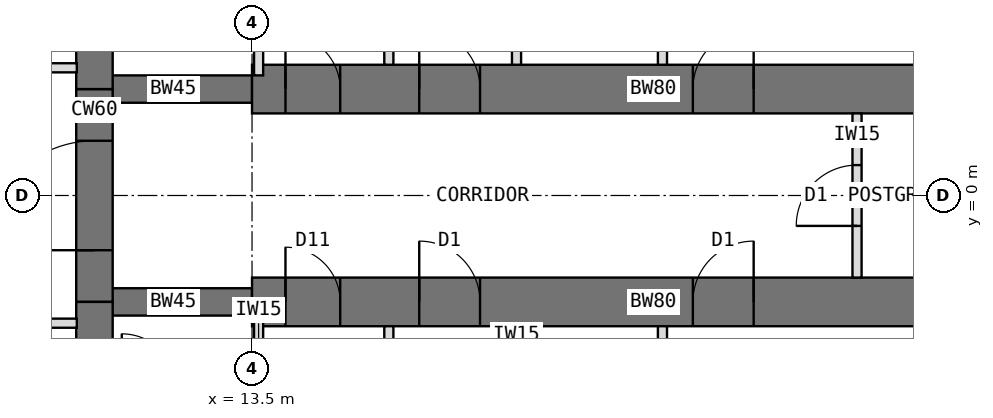
"""IFC4 building model, lengths in metres.
Left out: names, types, materials, properties, quantities, classifications, styles, units other than length and angle.
Written with IfcOpenShell. Run it as: python <this file> out.ifc"""

import sys

from ifc_helpers import new_model, si_unit, direction, frame, frame_2d, origin, place, context, subcontext, project, spatial, rectangle, extrude, element, fill, save


model = new_model("IFC4")
c1 = context("Model", 3, precision=1e-05, world=origin(), true_north=direction((0.0, 1.0)))
c2 = subcontext(c1, "Body", "Model", "MODEL_VIEW")
j1 = project(units=[si_unit("LENGTHUNIT", "METRE"), si_unit("PLANEANGLEUNIT", "RADIAN")], contexts=[c1])
p1 = place(None, origin())
s1 = spatial("IfcSite", under=j1, at=p1, CompositionType="ELEMENT")
p2 = place(p1, origin())
s2 = spatial("IfcBuilding", under=s1, at=p2, CompositionType="ELEMENT")
p3 = place(p2, frame((0.0, 0.0, 133.5)))
s3 = spatial("IfcBuildingStorey", under=s2, at=p3, CompositionType="ELEMENT", Elevation=133.5)
p4 = place(p3, frame((10.908, -6.298, 0.0), z_axis=(0.0, 0.0, 1.0), x_axis=(0.0, 1.0, 0.0)))
e1 = element("IfcWall", 1, at=p4, inside=s3, PredefinedType="SHEAR", context=c2, shape_type="SweptSolid", body=[
    extrude(rectangle(XDim=4.548, YDim=0.6, at=frame_2d((2.274, 0.0))), origin(), (0.0, 0.0, 1.0), 4.0),
])
p5 = place(p3, frame((10.908, -1.75, 0.0), z_axis=(0.0, 0.0, 1.0), x_axis=(0.0, 1.0, 0.0)))
e2 = element("IfcWall", 2, at=p5, inside=s3, PredefinedType="SHEAR", context=c2, shape_type="SweptSolid", body=[
    extrude(rectangle(XDim=3.5, YDim=0.6, at=frame_2d((1.75, 0.0))), origin(), (0.0, 0.0, 1.0), 4.0),
])
p6 = place(p5, frame((0.85, 0.0, 0.0)))
e3 = element("IfcOpeningElement", 3, at=p6, cuts=e2, PredefinedType="OPENING", context=c2, shape_type="SweptSolid", body=[
    extrude(rectangle(XDim=1.8, YDim=2.1, at=frame_2d((0.9, 1.05))), frame((0.0, 0.31, 0.0), z_axis=(0.0, -1.0, 0.0), x_axis=(1.0, 0.0, 0.0)), (0.0, 0.0, 1.0), 0.62),
])
p7 = place(p3, frame((10.908, 1.75, 0.0), z_axis=(0.0, 0.0, 1.0), x_axis=(0.0, 1.0, 0.0)))
e4 = element("IfcWall", 4, at=p7, inside=s3, PredefinedType="SHEAR", context=c2, shape_type="SweptSolid", body=[
    extrude(rectangle(XDim=4.548, YDim=0.6, at=frame_2d((2.274, 0.0))), origin(), (0.0, 0.0, 1.0), 4.0),
])
p8 = place(p3, frame((10.908, 1.75, 0.0), z_axis=(0.0, 0.0, 1.0), x_axis=(1.0, 0.0, 0.0)))
e5 = element("IfcWall", 5, at=p8, inside=s3, PredefinedType="SHEAR", context=c2, shape_type="SweptSolid", body=[
    extrude(rectangle(XDim=2.592, YDim=0.45, at=frame_2d((1.296, 0.0))), origin(), (0.0, 0.0, 1.0), 4.0),
])
p9 = place(p3, frame((13.5, 1.75, 0.0), z_axis=(0.0, 0.0, 1.0), x_axis=(1.0, 0.0, 0.0)))
e6 = element("IfcWall", 6, at=p9, inside=s3, PredefinedType="SHEAR", context=c2, shape_type="SweptSolid", body=[
    extrude(rectangle(XDim=13.2, YDim=0.8, at=frame_2d((6.6, 0.0))), origin(), (0.0, 0.0, 1.0), 4.0),
])
p10 = place(p9, frame((0.55, 0.0, 0.0)))
e7 = element("IfcOpeningElement", 7, at=p10, cuts=e6, PredefinedType="OPENING", context=c2, shape_type="SweptSolid", body=[
    extrude(rectangle(XDim=0.9, YDim=2.1, at=frame_2d((0.45, 1.05))), frame((0.0, 0.41, 0.0), z_axis=(0.0, -1.0, 0.0), x_axis=(1.0, 0.0, 0.0)), (0.0, 0.0, 1.0), 0.82),
])
p11 = place(p9, frame((2.75, 0.0, 0.0)))
e8 = element("IfcOpeningElement", 8, at=p11, cuts=e6, PredefinedType="OPENING", context=c2, shape_type="SweptSolid", body=[
    extrude(rectangle(XDim=1.0, YDim=2.1, at=frame_2d((0.5, 1.05))), frame((0.0, 0.41, 0.0), z_axis=(0.0, -1.0, 0.0), x_axis=(1.0, 0.0, 0.0)), (0.0, 0.0, 1.0), 0.82),
])
p12 = place(p9, frame((7.25, 0.0, 0.0)))
e9 = element("IfcOpeningElement", 9, at=p12, cuts=e6, PredefinedType="OPENING", context=c2, shape_type="SweptSolid", body=[
    extrude(rectangle(XDim=1.0, YDim=2.1, at=frame_2d((0.5, 1.05))), frame((0.0, 0.41, 0.0), z_axis=(0.0, -1.0, 0.0), x_axis=(1.0, 0.0, 0.0)), (0.0, 0.0, 1.0), 0.82),
])
p13 = place(p3, frame((10.908, -1.75, 0.0), z_axis=(0.0, 0.0, 1.0), x_axis=(1.0, 0.0, 0.0)))
e10 = element("IfcWall", 10, at=p13, inside=s3, PredefinedType="SHEAR", context=c2, shape_type="SweptSolid", body=[
    extrude(rectangle(XDim=2.592, YDim=0.45, at=frame_2d((1.296, 0.0))), origin(), (0.0, 0.0, 1.0), 4.0),
])
p14 = place(p3, frame((13.5, -1.75, 0.0), z_axis=(0.0, 0.0, 1.0), x_axis=(1.0, 0.0, 0.0)))
e11 = element("IfcWall", 11, at=p14, inside=s3, PredefinedType="SHEAR", context=c2, shape_type="SweptSolid", body=[
    extrude(rectangle(XDim=13.2, YDim=0.8, at=frame_2d((6.6, 0.0))), origin(), (0.0, 0.0, 1.0), 4.0),
])
p15 = place(p14, frame((0.55, 0.0, 0.0)))
e12 = element("IfcOpeningElement", 12, at=p15, cuts=e11, PredefinedType="OPENING", context=c2, shape_type="SweptSolid", body=[
    extrude(rectangle(XDim=0.9, YDim=2.1, at=frame_2d((0.45, 1.05))), frame((0.0, 0.41, 0.0), z_axis=(0.0, -1.0, 0.0), x_axis=(1.0, 0.0, 0.0)), (0.0, 0.0, 1.0), 0.82),
])
p16 = place(p14, frame((2.75, 0.0, 0.0)))
e13 = element("IfcOpeningElement", 13, at=p16, cuts=e11, PredefinedType="OPENING", context=c2, shape_type="SweptSolid", body=[
    extrude(rectangle(XDim=1.0, YDim=2.1, at=frame_2d((0.5, 1.05))), frame((0.0, 0.41, 0.0), z_axis=(0.0, -1.0, 0.0), x_axis=(1.0, 0.0, 0.0)), (0.0, 0.0, 1.0), 0.82),
])
p17 = place(p14, frame((7.25, 0.0, 0.0)))
e14 = element("IfcOpeningElement", 14, at=p17, cuts=e11, PredefinedType="OPENING", context=c2, shape_type="SweptSolid", body=[
    extrude(rectangle(XDim=1.0, YDim=2.1, at=frame_2d((0.5, 1.05))), frame((0.0, 0.41, 0.0), z_axis=(0.0, -1.0, 0.0), x_axis=(1.0, 0.0, 0.0)), (0.0, 0.0, 1.0), 0.82),
])
for number, where, z_axis, x_axis in (
    (15, (15.75, 2.15, 0.0), (0.0, 0.0, 1.0), (0.0, 1.0, 0.0)),
    (16, (20.25, 2.15, 0.0), (0.0, 0.0, 1.0), (0.0, 1.0, 0.0)),
):
    element("IfcWall", number, at=place(p3, frame(where, z_axis=z_axis, x_axis=x_axis)), inside=s3, PredefinedType="PARTITIONING", context=c2, shape_type="SweptSolid", body=[
        extrude(rectangle(XDim=4.6, YDim=0.15, at=frame_2d((2.3, 0.0))), origin(), (0.0, 0.0, 1.0), 3.8),
    ])
p18 = place(p3, frame((17.85, 2.15, 0.0), z_axis=(0.0, 0.0, 1.0), x_axis=(0.0, 1.0, 0.0)))
e17 = element("IfcWall", 17, at=p18, inside=s3, PredefinedType="PARTITIONING", context=c2, shape_type="SweptSolid", body=[
    extrude(rectangle(XDim=3.4, YDim=0.15, at=frame_2d((1.7, 0.0))), origin(), (0.0, 0.0, 1.0), 3.8),
])
p19 = place(p18, frame((1.2, 0.0, 0.0)))
e18 = element("IfcOpeningElement", 18, at=p19, cuts=e17, PredefinedType="OPENING", context=c2, shape_type="SweptSolid", body=[
    extrude(rectangle(XDim=1.0, YDim=2.1, at=frame_2d((0.5, 1.05))), frame((0.0, 0.085, 0.0), z_axis=(0.0, -1.0, 0.0), x_axis=(1.0, 0.0, 0.0)), (0.0, 0.0, 1.0), 0.17),
])
p20 = place(p3, frame((13.608, 1.975, 0.0), z_axis=(0.0, 0.0, 1.0), x_axis=(0.0, 1.0, 0.0)))
e19 = element("IfcWall", 19, at=p20, inside=s3, PredefinedType="PARTITIONING", context=c2, shape_type="SweptSolid", body=[
    extrude(rectangle(XDim=3.2, YDim=0.15, at=frame_2d((1.6, 0.0))), origin(), (0.0, 0.0, 1.0), 3.8),
])
for number, where, z_axis, x_axis in (
    (20, (15.75, -2.15, 0.0), (0.0, 0.0, 1.0), (0.0, -1.0, 0.0)),
    (21, (20.25, -2.15, 0.0), (0.0, 0.0, 1.0), (0.0, -1.0, 0.0)),
):
    element("IfcWall", number, at=place(p3, frame(where, z_axis=z_axis, x_axis=x_axis)), inside=s3, PredefinedType="PARTITIONING", context=c2, shape_type="SweptSolid", body=[
        extrude(rectangle(XDim=4.6, YDim=0.15, at=frame_2d((2.3, 0.0))), origin(), (0.0, 0.0, 1.0), 3.8),
    ])
p21 = place(p3, frame((17.85, -2.15, 0.0), z_axis=(0.0, 0.0, 1.0), x_axis=(0.0, -1.0, 0.0)))
e22 = element("IfcWall", 22, at=p21, inside=s3, PredefinedType="PARTITIONING", context=c2, shape_type="SweptSolid", body=[
    extrude(rectangle(XDim=3.4, YDim=0.15, at=frame_2d((1.7, 0.0))), origin(), (0.0, 0.0, 1.0), 3.8),
])
p22 = place(p21, frame((1.2, 0.0, 0.0)))
e23 = element("IfcOpeningElement", 23, at=p22, cuts=e22, PredefinedType="OPENING", context=c2, shape_type="SweptSolid", body=[
    extrude(rectangle(XDim=1.0, YDim=2.1, at=frame_2d((0.5, 1.05))), frame((0.0, 0.085, 0.0), z_axis=(0.0, -1.0, 0.0), x_axis=(1.0, 0.0, 0.0)), (0.0, 0.0, 1.0), 0.17),
])
p23 = place(p3, frame((13.608, -1.975, 0.0), z_axis=(0.0, 0.0, 1.0), x_axis=(0.0, -1.0, 0.0)))
e24 = element("IfcWall", 24, at=p23, inside=s3, PredefinedType="PARTITIONING", context=c2, shape_type="SweptSolid", body=[
    extrude(rectangle(XDim=1.2, YDim=0.15, at=frame_2d((0.6, 0.0))), origin(), (0.0, 0.0, 1.0), 3.8),
])
p24 = place(p3, frame((6.143, 2.1, 0.0), z_axis=(0.0, 0.0, 1.0), x_axis=(1.0, 0.0, 0.0)))
e25 = element("IfcWall", 25, at=p24, inside=s3, PredefinedType="PARTITIONING", context=c2, shape_type="SweptSolid", body=[
    extrude(rectangle(XDim=4.476, YDim=0.15, at=frame_2d((2.238, 0.0))), origin(), (0.0, 0.0, 1.0), 3.8),
])
p25 = place(p24, frame((2.633, 0.0, 0.0)))
e26 = element("IfcOpeningElement", 26, at=p25, cuts=e25, PredefinedType="OPENING", context=c2, shape_type="SweptSolid", body=[
    extrude(rectangle(XDim=1.0, YDim=2.1, at=frame_2d((0.5, 1.05))), frame((0.0, 0.085, 0.0), z_axis=(0.0, -1.0, 0.0), x_axis=(1.0, 0.0, 0.0)), (0.0, 0.0, 1.0), 0.17),
])
p26 = place(p3, frame((10.618, -2.1, 0.0), z_axis=(0.0, 0.0, 1.0), x_axis=(-1.0, 0.0, 0.0)))
e27 = element("IfcWall", 27, at=p26, inside=s3, PredefinedType="PARTITIONING", context=c2, shape_type="SweptSolid", body=[
    extrude(rectangle(XDim=4.476, YDim=0.15, at=frame_2d((2.238, 0.0))), origin(), (0.0, 0.0, 1.0), 3.8),
])
p27 = place(p26, frame((0.843, 0.0, 0.0)))
e28 = element("IfcOpeningElement", 28, at=p27, cuts=e27, PredefinedType="OPENING", context=c2, shape_type="SweptSolid", body=[
    extrude(rectangle(XDim=1.0, YDim=2.1, at=frame_2d((0.5, 1.05))), frame((0.0, 0.085, 0.0), z_axis=(0.0, -1.0, 0.0), x_axis=(1.0, 0.0, 0.0)), (0.0, 0.0, 1.0), 0.17),
])
p28 = place(p3, frame((23.45, -1.35, 0.0), z_axis=(0.0, 0.0, 1.0), x_axis=(0.0, 1.0, 0.0)))
e29 = element("IfcWall", 29, at=p28, inside=s3, PredefinedType="PARTITIONING", context=c2, shape_type="SweptSolid", body=[
    extrude(rectangle(XDim=2.7, YDim=0.15, at=frame_2d((1.35, 0.0))), origin(), (0.0, 0.0, 1.0), 3.8),
])
p29 = place(p28, frame((0.85, 0.0, 0.0)))
e30 = element("IfcOpeningElement", 30, at=p29, cuts=e29, PredefinedType="OPENING", context=c2, shape_type="SweptSolid", body=[
    extrude(rectangle(XDim=1.0, YDim=2.1, at=frame_2d((0.5, 1.05))), frame((0.0, 0.085, 0.0), z_axis=(0.0, -1.0, 0.0), x_axis=(1.0, 0.0, 0.0)), (0.0, 0.0, 1.0), 0.17),
])
p30 = place(p6, origin())
e31 = element("IfcDoor", 31, at=p30, inside=s3, OperationType="DOUBLE_DOOR_DOUBLE_SWING", PredefinedType="DOOR", context=c2, shape_type="SweptSolid", body=[
    extrude(rectangle(XDim=1.72, YDim=2.06, at=frame_2d((0.9, 1.03))), frame((0.0, 0.025, 0.0), z_axis=(0.0, -1.0, 0.0), x_axis=(1.0, 0.0, 0.0)), (0.0, 0.0, 1.0), 0.05),
    extrude(rectangle(XDim=0.04, YDim=2.1, at=frame_2d((0.02, 1.05))), frame((0.0, 0.3, 0.0), z_axis=(0.0, -1.0, 0.0), x_axis=(1.0, 0.0, 0.0)), (0.0, 0.0, 1.0), 0.6),
    extrude(rectangle(XDim=0.04, YDim=2.1, at=frame_2d((1.78, 1.05))), frame((0.0, 0.3, 0.0), z_axis=(0.0, -1.0, 0.0), x_axis=(1.0, 0.0, 0.0)), (0.0, 0.0, 1.0), 0.6),
    extrude(rectangle(XDim=1.72, YDim=0.04, at=frame_2d((0.9, 2.08))), frame((0.0, 0.3, 0.0), z_axis=(0.0, -1.0, 0.0), x_axis=(1.0, 0.0, 0.0)), (0.0, 0.0, 1.0), 0.6),
])
fill(e3, e31)
p31 = place(p29, origin())
e32 = element("IfcDoor", 32, at=p31, inside=s3, OperationType="SINGLE_SWING_LEFT", PredefinedType="DOOR", context=c2, shape_type="SweptSolid", body=[
    extrude(rectangle(XDim=1.0, YDim=2.1, at=frame_2d((0.5, 1.05))), frame((0.0, 0.025, 0.0), z_axis=(0.0, -1.0, 0.0), x_axis=(1.0, 0.0, 0.0)), (0.0, 0.0, 1.0), 0.05),
])
fill(e30, e32)
p32 = place(p10, origin())
e33 = element("IfcDoor", 33, at=p32, inside=s3, OperationType="SINGLE_SWING_LEFT", PredefinedType="DOOR", context=c2, shape_type="SweptSolid", body=[
    extrude(rectangle(XDim=0.82, YDim=2.06, at=frame_2d((0.45, 1.03))), frame((0.0, 0.025, 0.0), z_axis=(0.0, -1.0, 0.0), x_axis=(1.0, 0.0, 0.0)), (0.0, 0.0, 1.0), 0.05),
    extrude(rectangle(XDim=0.04, YDim=2.1, at=frame_2d((0.02, 1.05))), frame((0.0, 0.4, 0.0), z_axis=(0.0, -1.0, 0.0), x_axis=(1.0, 0.0, 0.0)), (0.0, 0.0, 1.0), 0.8),
    extrude(rectangle(XDim=0.04, YDim=2.1, at=frame_2d((0.88, 1.05))), frame((0.0, 0.4, 0.0), z_axis=(0.0, -1.0, 0.0), x_axis=(1.0, 0.0, 0.0)), (0.0, 0.0, 1.0), 0.8),
    extrude(rectangle(XDim=0.82, YDim=0.04, at=frame_2d((0.45, 2.08))), frame((0.0, 0.4, 0.0), z_axis=(0.0, -1.0, 0.0), x_axis=(1.0, 0.0, 0.0)), (0.0, 0.0, 1.0), 0.8),
])
fill(e7, e33)
p33 = place(p11, origin())
e34 = element("IfcDoor", 34, at=p33, inside=s3, OperationType="SINGLE_SWING_LEFT", PredefinedType="DOOR", context=c2, shape_type="SweptSolid", body=[
    extrude(rectangle(XDim=0.92, YDim=2.06, at=frame_2d((0.5, 1.03))), frame((0.0, 0.025, 0.0), z_axis=(0.0, -1.0, 0.0), x_axis=(1.0, 0.0, 0.0)), (0.0, 0.0, 1.0), 0.05),
    extrude(rectangle(XDim=0.04, YDim=2.1, at=frame_2d((0.02, 1.05))), frame((0.0, 0.4, 0.0), z_axis=(0.0, -1.0, 0.0), x_axis=(1.0, 0.0, 0.0)), (0.0, 0.0, 1.0), 0.8),
    extrude(rectangle(XDim=0.04, YDim=2.1, at=frame_2d((0.98, 1.05))), frame((0.0, 0.4, 0.0), z_axis=(0.0, -1.0, 0.0), x_axis=(1.0, 0.0, 0.0)), (0.0, 0.0, 1.0), 0.8),
    extrude(rectangle(XDim=0.92, YDim=0.04, at=frame_2d((0.5, 2.08))), frame((0.0, 0.4, 0.0), z_axis=(0.0, -1.0, 0.0), x_axis=(1.0, 0.0, 0.0)), (0.0, 0.0, 1.0), 0.8),
])
fill(e8, e34)
p34 = place(p12, origin())
e35 = element("IfcDoor", 35, at=p34, inside=s3, OperationType="SINGLE_SWING_RIGHT", PredefinedType="DOOR", context=c2, shape_type="SweptSolid", body=[
    extrude(rectangle(XDim=0.92, YDim=2.06, at=frame_2d((0.5, 1.03))), frame((0.0, 0.025, 0.0), z_axis=(0.0, -1.0, 0.0), x_axis=(1.0, 0.0, 0.0)), (0.0, 0.0, 1.0), 0.05),
    extrude(rectangle(XDim=0.04, YDim=2.1, at=frame_2d((0.02, 1.05))), frame((0.0, 0.4, 0.0), z_axis=(0.0, -1.0, 0.0), x_axis=(1.0, 0.0, 0.0)), (0.0, 0.0, 1.0), 0.8),
    extrude(rectangle(XDim=0.04, YDim=2.1, at=frame_2d((0.98, 1.05))), frame((0.0, 0.4, 0.0), z_axis=(0.0, -1.0, 0.0), x_axis=(1.0, 0.0, 0.0)), (0.0, 0.0, 1.0), 0.8),
    extrude(rectangle(XDim=0.92, YDim=0.04, at=frame_2d((0.5, 2.08))), frame((0.0, 0.4, 0.0), z_axis=(0.0, -1.0, 0.0), x_axis=(1.0, 0.0, 0.0)), (0.0, 0.0, 1.0), 0.8),
])
fill(e9, e35)
p35 = place(p15, origin())
e36 = element("IfcDoor", 36, at=p35, inside=s3, OperationType="SINGLE_SWING_LEFT", PredefinedType="DOOR", context=c2, shape_type="SweptSolid", body=[
    extrude(rectangle(XDim=0.82, YDim=2.06, at=frame_2d((0.45, 1.03))), frame((0.0, 0.025, 0.0), z_axis=(0.0, -1.0, 0.0), x_axis=(1.0, 0.0, 0.0)), (0.0, 0.0, 1.0), 0.05),
    extrude(rectangle(XDim=0.04, YDim=2.1, at=frame_2d((0.02, 1.05))), frame((0.0, 0.4, 0.0), z_axis=(0.0, -1.0, 0.0), x_axis=(1.0, 0.0, 0.0)), (0.0, 0.0, 1.0), 0.8),
    extrude(rectangle(XDim=0.04, YDim=2.1, at=frame_2d((0.88, 1.05))), frame((0.0, 0.4, 0.0), z_axis=(0.0, -1.0, 0.0), x_axis=(1.0, 0.0, 0.0)), (0.0, 0.0, 1.0), 0.8),
    extrude(rectangle(XDim=0.82, YDim=0.04, at=frame_2d((0.45, 2.08))), frame((0.0, 0.4, 0.0), z_axis=(0.0, -1.0, 0.0), x_axis=(1.0, 0.0, 0.0)), (0.0, 0.0, 1.0), 0.8),
])
fill(e12, e36)
p36 = place(p16, origin())
e37 = element("IfcDoor", 37, at=p36, inside=s3, OperationType="SINGLE_SWING_LEFT", PredefinedType="DOOR", context=c2, shape_type="SweptSolid", body=[
    extrude(rectangle(XDim=0.92, YDim=2.06, at=frame_2d((0.5, 1.03))), frame((0.0, 0.025, 0.0), z_axis=(0.0, -1.0, 0.0), x_axis=(1.0, 0.0, 0.0)), (0.0, 0.0, 1.0), 0.05),
    extrude(rectangle(XDim=0.04, YDim=2.1, at=frame_2d((0.02, 1.05))), frame((0.0, 0.4, 0.0), z_axis=(0.0, -1.0, 0.0), x_axis=(1.0, 0.0, 0.0)), (0.0, 0.0, 1.0), 0.8),
    extrude(rectangle(XDim=0.04, YDim=2.1, at=frame_2d((0.98, 1.05))), frame((0.0, 0.4, 0.0), z_axis=(0.0, -1.0, 0.0), x_axis=(1.0, 0.0, 0.0)), (0.0, 0.0, 1.0), 0.8),
    extrude(rectangle(XDim=0.92, YDim=0.04, at=frame_2d((0.5, 2.08))), frame((0.0, 0.4, 0.0), z_axis=(0.0, -1.0, 0.0), x_axis=(1.0, 0.0, 0.0)), (0.0, 0.0, 1.0), 0.8),
])
fill(e13, e37)
p37 = place(p17, origin())
e38 = element("IfcDoor", 38, at=p37, inside=s3, OperationType="SINGLE_SWING_RIGHT", PredefinedType="DOOR", context=c2, shape_type="SweptSolid", body=[
    extrude(rectangle(XDim=0.92, YDim=2.06, at=frame_2d((0.5, 1.03))), frame((0.0, 0.025, 0.0), z_axis=(0.0, -1.0, 0.0), x_axis=(1.0, 0.0, 0.0)), (0.0, 0.0, 1.0), 0.05),
    extrude(rectangle(XDim=0.04, YDim=2.1, at=frame_2d((0.02, 1.05))), frame((0.0, 0.4, 0.0), z_axis=(0.0, -1.0, 0.0), x_axis=(1.0, 0.0, 0.0)), (0.0, 0.0, 1.0), 0.8),
    extrude(rectangle(XDim=0.04, YDim=2.1, at=frame_2d((0.98, 1.05))), frame((0.0, 0.4, 0.0), z_axis=(0.0, -1.0, 0.0), x_axis=(1.0, 0.0, 0.0)), (0.0, 0.0, 1.0), 0.8),
    extrude(rectangle(XDim=0.92, YDim=0.04, at=frame_2d((0.5, 2.08))), frame((0.0, 0.4, 0.0), z_axis=(0.0, -1.0, 0.0), x_axis=(1.0, 0.0, 0.0)), (0.0, 0.0, 1.0), 0.8),
])
fill(e14, e38)
save(model, sys.argv[1])
